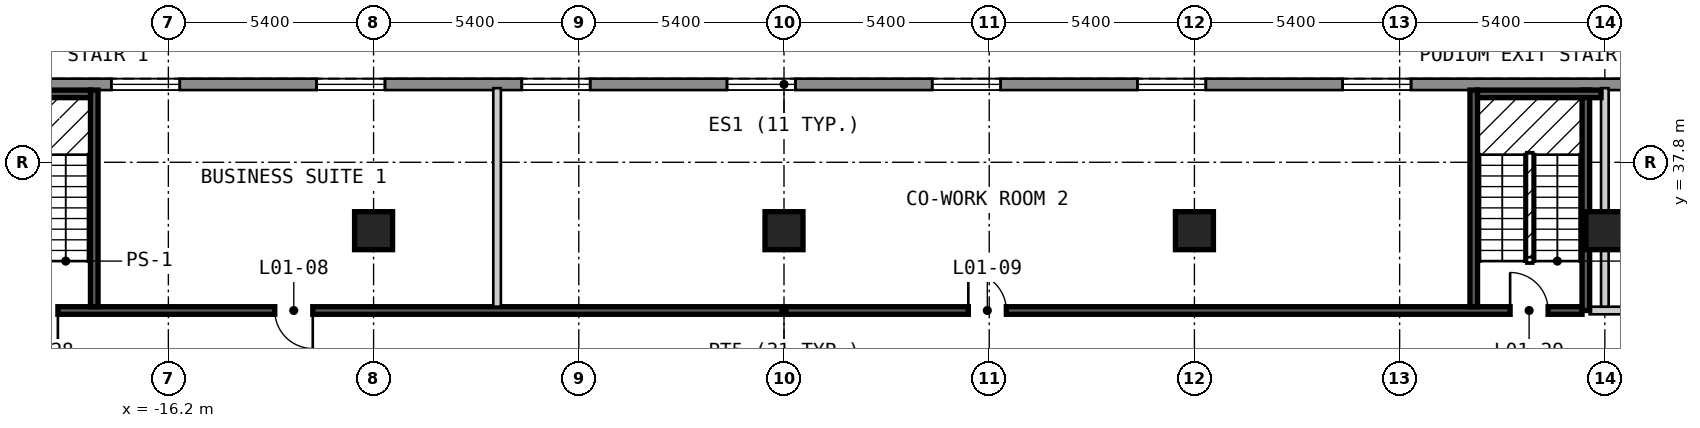
"""IFC4 building model, lengths in metres.
Left out: names, types, materials, properties, quantities, classifications, styles, units other than length and angle.
Written with IfcOpenShell. Run it as: python <this file> out.ifc"""

import sys

from ifc_helpers import new_model, si_unit, direction, frame, frame_2d, origin, origin_2d, place, context, subcontext, project, spatial, rectangle, extrude, element, fill, save


model = new_model("IFC4")
c1 = context("Model", 3, precision=1e-05, world=origin(), true_north=direction((0.0, 1.0)))
c2 = subcontext(c1, "Body", "Model", "MODEL_VIEW")
j1 = project(units=[si_unit("LENGTHUNIT", "METRE"), si_unit("PLANEANGLEUNIT", "RADIAN")], contexts=[c1])
p1 = place(None, origin())
s1 = spatial("IfcSite", under=j1, at=p1, CompositionType="ELEMENT")
p2 = place(p1, origin())
s2 = spatial("IfcBuilding", under=s1, at=p2, CompositionType="ELEMENT")
p3 = place(p2, frame((0.0, 0.0, 5.0)))
s3 = spatial("IfcBuildingStorey", under=s2, at=p3, CompositionType="ELEMENT", Elevation=5.0)
for number, where, z_axis, x_axis in (
    (1, (-10.8, 36.0, 0.0), (0.0, 0.0, 1.0), (1.0, 0.0, 0.0)),
    (2, (0.0, 36.0, 0.0), (0.0, 0.0, 1.0), (1.0, 0.0, 0.0)),
    (3, (10.8, 36.0, 0.0), (0.0, 0.0, 1.0), (1.0, 0.0, 0.0)),
    (4, (21.6, 36.0, 0.0), (0.0, 0.0, 1.0), (1.0, 0.0, 0.0)),
):
    element("IfcColumn", number, at=place(p3, frame(where, z_axis=z_axis, x_axis=x_axis)), inside=s3, PredefinedType="COLUMN", context=c2, shape_type="SweptSolid", body=[
        extrude(rectangle(XDim=1.0, YDim=1.0, at=origin_2d()), origin(), (0.0, 0.0, 1.0), 4.0),
    ])
p4 = place(p3, frame((47.4, 39.85, 0.0), z_axis=(0.0, 0.0, 1.0), x_axis=(-1.0, 0.0, 0.0)))
e5 = element("IfcWall", 5, at=p4, inside=s3, PredefinedType="SOLIDWALL", context=c2, shape_type="SweptSolid", body=[
    extrude(rectangle(XDim=94.8, YDim=0.3, at=frame_2d((47.4, 0.0))), origin(), (0.0, 0.0, 1.0), 3.5),
])
p5 = place(p4, frame((3.9, 0.0, 0.9)))
e6 = element("IfcOpeningElement", 6, at=p5, cuts=e5, PredefinedType="OPENING", context=c2, shape_type="SweptSolid", body=[
    extrude(rectangle(XDim=1.8, YDim=2.4, at=frame_2d((0.9, 1.2))), frame((0.0, 0.16, 0.0), z_axis=(0.0, -1.0, 0.0), x_axis=(1.0, 0.0, 0.0)), (0.0, 0.0, 1.0), 0.32),
])
p6 = place(p4, frame((9.3, 0.0, 0.9)))
e7 = element("IfcOpeningElement", 7, at=p6, cuts=e5, PredefinedType="OPENING", context=c2, shape_type="SweptSolid", body=[
    extrude(rectangle(XDim=1.8, YDim=2.4, at=frame_2d((0.9, 1.2))), frame((0.0, 0.16, 0.0), z_axis=(0.0, -1.0, 0.0), x_axis=(1.0, 0.0, 0.0)), (0.0, 0.0, 1.0), 0.32),
])
p7 = place(p4, frame((14.7, 0.0, 0.9)))
e8 = element("IfcOpeningElement", 8, at=p7, cuts=e5, PredefinedType="OPENING", context=c2, shape_type="SweptSolid", body=[
    extrude(rectangle(XDim=1.8, YDim=2.4, at=frame_2d((0.9, 1.2))), frame((0.0, 0.16, 0.0), z_axis=(0.0, -1.0, 0.0), x_axis=(1.0, 0.0, 0.0)), (0.0, 0.0, 1.0), 0.32),
])
p8 = place(p4, frame((20.1, 0.0, 0.9)))
e9 = element("IfcOpeningElement", 9, at=p8, cuts=e5, PredefinedType="OPENING", context=c2, shape_type="SweptSolid", body=[
    extrude(rectangle(XDim=1.8, YDim=2.4, at=frame_2d((0.9, 1.2))), frame((0.0, 0.16, 0.0), z_axis=(0.0, -1.0, 0.0), x_axis=(1.0, 0.0, 0.0)), (0.0, 0.0, 1.0), 0.32),
])
p9 = place(p4, frame((30.9, 0.0, 0.9)))
e10 = element("IfcOpeningElement", 10, at=p9, cuts=e5, PredefinedType="OPENING", context=c2, shape_type="SweptSolid", body=[
    extrude(rectangle(XDim=1.8, YDim=2.4, at=frame_2d((0.9, 1.2))), frame((0.0, 0.16, 0.0), z_axis=(0.0, -1.0, 0.0), x_axis=(1.0, 0.0, 0.0)), (0.0, 0.0, 1.0), 0.32),
])
p10 = place(p4, frame((36.3, 0.0, 0.9)))
e11 = element("IfcOpeningElement", 11, at=p10, cuts=e5, PredefinedType="OPENING", context=c2, shape_type="SweptSolid", body=[
    extrude(rectangle(XDim=1.8, YDim=2.4, at=frame_2d((0.9, 1.2))), frame((0.0, 0.16, 0.0), z_axis=(0.0, -1.0, 0.0), x_axis=(1.0, 0.0, 0.0)), (0.0, 0.0, 1.0), 0.32),
])
p11 = place(p4, frame((41.7, 0.0, 0.9)))
e12 = element("IfcOpeningElement", 12, at=p11, cuts=e5, PredefinedType="OPENING", context=c2, shape_type="SweptSolid", body=[
    extrude(rectangle(XDim=1.8, YDim=2.4, at=frame_2d((0.9, 1.2))), frame((0.0, 0.16, 0.0), z_axis=(0.0, -1.0, 0.0), x_axis=(1.0, 0.0, 0.0)), (0.0, 0.0, 1.0), 0.32),
])
p12 = place(p4, frame((47.1, 0.0, 0.9)))
e13 = element("IfcOpeningElement", 13, at=p12, cuts=e5, PredefinedType="OPENING", context=c2, shape_type="SweptSolid", body=[
    extrude(rectangle(XDim=1.8, YDim=2.4, at=frame_2d((0.9, 1.2))), frame((0.0, 0.16, 0.0), z_axis=(0.0, -1.0, 0.0), x_axis=(1.0, 0.0, 0.0)), (0.0, 0.0, 1.0), 0.32),
])
p13 = place(p4, frame((52.5, 0.0, 0.9)))
e14 = element("IfcOpeningElement", 14, at=p13, cuts=e5, PredefinedType="OPENING", context=c2, shape_type="SweptSolid", body=[
    extrude(rectangle(XDim=1.8, YDim=2.4, at=frame_2d((0.9, 1.2))), frame((0.0, 0.16, 0.0), z_axis=(0.0, -1.0, 0.0), x_axis=(1.0, 0.0, 0.0)), (0.0, 0.0, 1.0), 0.32),
])
p14 = place(p4, frame((57.9, 0.0, 0.9)))
e15 = element("IfcOpeningElement", 15, at=p14, cuts=e5, PredefinedType="OPENING", context=c2, shape_type="SweptSolid", body=[
    extrude(rectangle(XDim=1.8, YDim=2.4, at=frame_2d((0.9, 1.2))), frame((0.0, 0.16, 0.0), z_axis=(0.0, -1.0, 0.0), x_axis=(1.0, 0.0, 0.0)), (0.0, 0.0, 1.0), 0.32),
])
p15 = place(p4, frame((63.3, 0.0, 0.9)))
e16 = element("IfcOpeningElement", 16, at=p15, cuts=e5, PredefinedType="OPENING", context=c2, shape_type="SweptSolid", body=[
    extrude(rectangle(XDim=1.8, YDim=2.4, at=frame_2d((0.9, 1.2))), frame((0.0, 0.16, 0.0), z_axis=(0.0, -1.0, 0.0), x_axis=(1.0, 0.0, 0.0)), (0.0, 0.0, 1.0), 0.32),
])
p16 = place(p4, frame((74.1, 0.0, 0.9)))
e17 = element("IfcOpeningElement", 17, at=p16, cuts=e5, PredefinedType="OPENING", context=c2, shape_type="SweptSolid", body=[
    extrude(rectangle(XDim=1.8, YDim=2.4, at=frame_2d((0.9, 1.2))), frame((0.0, 0.16, 0.0), z_axis=(0.0, -1.0, 0.0), x_axis=(1.0, 0.0, 0.0)), (0.0, 0.0, 1.0), 0.32),
])
p17 = place(p4, frame((79.5, 0.0, 0.9)))
e18 = element("IfcOpeningElement", 18, at=p17, cuts=e5, PredefinedType="OPENING", context=c2, shape_type="SweptSolid", body=[
    extrude(rectangle(XDim=1.8, YDim=2.4, at=frame_2d((0.9, 1.2))), frame((0.0, 0.16, 0.0), z_axis=(0.0, -1.0, 0.0), x_axis=(1.0, 0.0, 0.0)), (0.0, 0.0, 1.0), 0.32),
])
p18 = place(p4, frame((84.9, 0.0, 0.9)))
e19 = element("IfcOpeningElement", 19, at=p18, cuts=e5, PredefinedType="OPENING", context=c2, shape_type="SweptSolid", body=[
    extrude(rectangle(XDim=1.8, YDim=2.4, at=frame_2d((0.9, 1.2))), frame((0.0, 0.16, 0.0), z_axis=(0.0, -1.0, 0.0), x_axis=(1.0, 0.0, 0.0)), (0.0, 0.0, 1.0), 0.32),
])
p19 = place(p4, frame((90.3, 0.0, 0.9)))
e20 = element("IfcOpeningElement", 20, at=p19, cuts=e5, PredefinedType="OPENING", context=c2, shape_type="SweptSolid", body=[
    extrude(rectangle(XDim=1.8, YDim=2.4, at=frame_2d((0.9, 1.2))), frame((0.0, 0.16, 0.0), z_axis=(0.0, -1.0, 0.0), x_axis=(1.0, 0.0, 0.0)), (0.0, 0.0, 1.0), 0.32),
])
p20 = place(p3, frame((-21.0, 33.9, 0.0), z_axis=(0.0, 0.0, 1.0), x_axis=(1.0, 0.0, 0.0)))
e21 = element("IfcWall", 21, at=p20, inside=s3, PredefinedType="SOLIDWALL", context=c2, shape_type="SweptSolid", body=[
    extrude(rectangle(XDim=42.0, YDim=0.2, at=frame_2d((21.0, 0.0))), origin(), (0.0, 0.0, 1.0), 3.5),
])
p21 = place(p20, frame((7.6, 0.0, 0.0)))
e22 = element("IfcOpeningElement", 22, at=p21, cuts=e21, PredefinedType="OPENING", context=c2, shape_type="SweptSolid", body=[
    extrude(rectangle(XDim=1.0, YDim=2.1, at=frame_2d((0.5, 1.05))), frame((0.0, 0.11, 0.0), z_axis=(0.0, -1.0, 0.0), x_axis=(1.0, 0.0, 0.0)), (0.0, 0.0, 1.0), 0.22),
])
p22 = place(p20, frame((25.85, 0.0, 0.0)))
e23 = element("IfcOpeningElement", 23, at=p22, cuts=e21, PredefinedType="OPENING", context=c2, shape_type="SweptSolid", body=[
    extrude(rectangle(XDim=1.0, YDim=2.1, at=frame_2d((0.5, 1.05))), frame((0.0, 0.11, 0.0), z_axis=(0.0, -1.0, 0.0), x_axis=(1.0, 0.0, 0.0)), (0.0, 0.0, 1.0), 0.22),
])
p23 = place(p20, frame((0.893, 0.0, 0.0)))
e24 = element("IfcOpeningElement", 24, at=p23, cuts=e21, PredefinedType="OPENING", context=c2, shape_type="SweptSolid", body=[
    extrude(rectangle(XDim=1.0, YDim=2.1, at=frame_2d((0.5, 1.05))), frame((0.0, 0.11, 0.0), z_axis=(0.0, -1.0, 0.0), x_axis=(1.0, 0.0, 0.0)), (0.0, 0.0, 1.0), 0.22),
])
p24 = place(p20, frame((40.107, 0.0, 0.0)))
e25 = element("IfcOpeningElement", 25, at=p24, cuts=e21, PredefinedType="OPENING", context=c2, shape_type="SweptSolid", body=[
    extrude(rectangle(XDim=1.0, YDim=2.1, at=frame_2d((0.5, 1.05))), frame((0.0, 0.11, 0.0), z_axis=(0.0, -1.0, 0.0), x_axis=(1.0, 0.0, 0.0)), (0.0, 0.0, 1.0), 0.22),
])
p25 = place(p3, frame((21.2, 33.9, 0.0), z_axis=(0.0, 0.0, 1.0), x_axis=(1.0, 0.0, 0.0)))
e26 = element("IfcWall", 26, at=p25, inside=s3, PredefinedType="PARTITIONING", context=c2, shape_type="SweptSolid", body=[
    extrude(rectangle(XDim=26.55, YDim=0.2, at=frame_2d((13.275, 0.0))), origin(), (0.0, 0.0, 1.0), 3.5),
])
p26 = place(p25, frame((8.419, 0.0, 0.0)))
e27 = element("IfcOpeningElement", 27, at=p26, cuts=e26, PredefinedType="OPENING", context=c2, shape_type="SweptSolid", body=[
    extrude(rectangle(XDim=1.0, YDim=2.1, at=frame_2d((0.5, 1.05))), frame((0.0, 0.11, 0.0), z_axis=(0.0, -1.0, 0.0), x_axis=(1.0, 0.0, 0.0)), (0.0, 0.0, 1.0), 0.22),
])
p27 = place(p3, frame((-18.15, 34.0, 0.0), z_axis=(0.0, 0.0, 1.0), x_axis=(0.0, 1.0, 0.0)))
e28 = element("IfcWall", 28, at=p27, inside=s3, PredefinedType="SOLIDWALL", context=c2, shape_type="SweptSolid", body=[
    extrude(rectangle(XDim=5.7, YDim=0.2, at=frame_2d((2.85, 0.0))), origin(), (0.0, 0.0, 1.0), 3.5),
])
p28 = place(p3, frame((-7.55, 34.0, 0.0), z_axis=(0.0, 0.0, 1.0), x_axis=(0.0, 1.0, 0.0)))
e29 = element("IfcWall", 29, at=p28, inside=s3, PredefinedType="PARTITIONING", context=c2, shape_type="SweptSolid", body=[
    extrude(rectangle(XDim=5.75, YDim=0.2, at=frame_2d((2.875, 0.0))), origin(), (0.0, 0.0, 1.0), 3.5),
])
p29 = place(p3, frame((18.15, 34.0, 0.0), z_axis=(0.0, 0.0, 1.0), x_axis=(0.0, 1.0, 0.0)))
e30 = element("IfcWall", 30, at=p29, inside=s3, PredefinedType="SOLIDWALL", context=c2, shape_type="SweptSolid", body=[
    extrude(rectangle(XDim=5.7, YDim=0.2, at=frame_2d((2.85, 0.0))), origin(), (0.0, 0.0, 1.0), 3.5),
])
p30 = place(p3, frame((21.1, 33.9, 0.0), z_axis=(0.0, 0.0, 1.0), x_axis=(0.0, 1.0, 0.0)))
e31 = element("IfcWall", 31, at=p30, inside=s3, PredefinedType="SOLIDWALL", context=c2, shape_type="SweptSolid", body=[
    extrude(rectangle(XDim=5.8, YDim=0.2, at=frame_2d((2.9, 0.0))), origin(), (0.0, 0.0, 1.0), 3.5),
])
p31 = place(p3, frame((21.6, 34.0, 0.0), z_axis=(0.0, 0.0, 1.0), x_axis=(0.0, 1.0, 0.0)))
e32 = element("IfcWall", 32, at=p31, inside=s3, PredefinedType="PARTITIONING", context=c2, shape_type="SweptSolid", body=[
    extrude(rectangle(XDim=5.75, YDim=0.2, at=frame_2d((2.875, 0.0))), origin(), (0.0, 0.0, 1.0), 3.5),
])
for number, where, z_axis, x_axis in (
    (33, (-21.5, 39.6, 0.0), (0.0, 0.0, 1.0), (1.0, 0.0, 0.0)),
    (34, (18.25, 39.6, 0.0), (0.0, 0.0, 1.0), (1.0, 0.0, 0.0)),
):
    element("IfcWall", number, at=place(p3, frame(where, z_axis=z_axis, x_axis=x_axis)), inside=s3, PredefinedType="SOLIDWALL", context=c2, shape_type="SweptSolid", body=[
        extrude(rectangle(XDim=3.25, YDim=0.2, at=frame_2d((1.625, 0.0))), origin(), (0.0, 0.0, 1.0), 3.5),
    ])
p32 = place(p9, origin())
e35 = element("IfcWindow", 35, at=p32, inside=s3, PartitioningType="SINGLE_PANEL", PredefinedType="WINDOW", context=c2, shape_type="SweptSolid", body=[
    extrude(rectangle(XDim=1.8, YDim=2.4, at=frame_2d((0.9, 1.2))), frame((0.0, 0.03, 0.0), z_axis=(0.0, -1.0, 0.0), x_axis=(1.0, 0.0, 0.0)), (0.0, 0.0, 1.0), 0.06),
])
fill(e10, e35)
p33 = place(p10, origin())
e36 = element("IfcWindow", 36, at=p33, inside=s3, PartitioningType="SINGLE_PANEL", PredefinedType="WINDOW", context=c2, shape_type="SweptSolid", body=[
    extrude(rectangle(XDim=1.8, YDim=2.4, at=frame_2d((0.9, 1.2))), frame((0.0, 0.03, 0.0), z_axis=(0.0, -1.0, 0.0), x_axis=(1.0, 0.0, 0.0)), (0.0, 0.0, 1.0), 0.06),
])
fill(e11, e36)
p34 = place(p11, origin())
e37 = element("IfcWindow", 37, at=p34, inside=s3, PartitioningType="SINGLE_PANEL", PredefinedType="WINDOW", context=c2, shape_type="SweptSolid", body=[
    extrude(rectangle(XDim=1.8, YDim=2.4, at=frame_2d((0.9, 1.2))), frame((0.0, 0.03, 0.0), z_axis=(0.0, -1.0, 0.0), x_axis=(1.0, 0.0, 0.0)), (0.0, 0.0, 1.0), 0.06),
])
fill(e12, e37)
p35 = place(p12, origin())
e38 = element("IfcWindow", 38, at=p35, inside=s3, PartitioningType="SINGLE_PANEL", PredefinedType="WINDOW", context=c2, shape_type="SweptSolid", body=[
    extrude(rectangle(XDim=1.8, YDim=2.4, at=frame_2d((0.9, 1.2))), frame((0.0, 0.03, 0.0), z_axis=(0.0, -1.0, 0.0), x_axis=(1.0, 0.0, 0.0)), (0.0, 0.0, 1.0), 0.06),
])
fill(e13, e38)
p36 = place(p13, origin())
e39 = element("IfcWindow", 39, at=p36, inside=s3, PartitioningType="SINGLE_PANEL", PredefinedType="WINDOW", context=c2, shape_type="SweptSolid", body=[
    extrude(rectangle(XDim=1.8, YDim=2.4, at=frame_2d((0.9, 1.2))), frame((0.0, 0.03, 0.0), z_axis=(0.0, -1.0, 0.0), x_axis=(1.0, 0.0, 0.0)), (0.0, 0.0, 1.0), 0.06),
])
fill(e14, e39)
p37 = place(p14, origin())
e40 = element("IfcWindow", 40, at=p37, inside=s3, PartitioningType="SINGLE_PANEL", PredefinedType="WINDOW", context=c2, shape_type="SweptSolid", body=[
    extrude(rectangle(XDim=1.8, YDim=2.4, at=frame_2d((0.9, 1.2))), frame((0.0, 0.03, 0.0), z_axis=(0.0, -1.0, 0.0), x_axis=(1.0, 0.0, 0.0)), (0.0, 0.0, 1.0), 0.06),
])
fill(e15, e40)
p38 = place(p15, origin())
e41 = element("IfcWindow", 41, at=p38, inside=s3, PartitioningType="SINGLE_PANEL", PredefinedType="WINDOW", context=c2, shape_type="SweptSolid", body=[
    extrude(rectangle(XDim=1.8, YDim=2.4, at=frame_2d((0.9, 1.2))), frame((0.0, 0.03, 0.0), z_axis=(0.0, -1.0, 0.0), x_axis=(1.0, 0.0, 0.0)), (0.0, 0.0, 1.0), 0.06),
])
fill(e16, e41)
p39 = place(p21, origin())
e42 = element("IfcDoor", 42, at=p39, inside=s3, OperationType="SINGLE_SWING_RIGHT", PredefinedType="DOOR", context=c2, shape_type="SweptSolid", body=[
    extrude(rectangle(XDim=1.0, YDim=2.1, at=frame_2d((0.5, 1.05))), frame((0.0, 0.025, 0.0), z_axis=(0.0, -1.0, 0.0), x_axis=(1.0, 0.0, 0.0)), (0.0, 0.0, 1.0), 0.05),
])
fill(e22, e42)
p40 = place(p22, origin())
e43 = element("IfcDoor", 43, at=p40, inside=s3, OperationType="SINGLE_SWING_LEFT", PredefinedType="DOOR", context=c2, shape_type="SweptSolid", body=[
    extrude(rectangle(XDim=1.0, YDim=2.1, at=frame_2d((0.5, 1.05))), frame((0.0, 0.025, 0.0), z_axis=(0.0, -1.0, 0.0), x_axis=(1.0, 0.0, 0.0)), (0.0, 0.0, 1.0), 0.05),
])
fill(e23, e43)
p41 = place(p23, origin())
e44 = element("IfcDoor", 44, at=p41, inside=s3, OperationType="SINGLE_SWING_RIGHT", PredefinedType="DOOR", context=c2, shape_type="SweptSolid", body=[
    extrude(rectangle(XDim=1.0, YDim=2.1, at=frame_2d((0.5, 1.05))), frame((0.0, 0.025, 0.0), z_axis=(0.0, -1.0, 0.0), x_axis=(1.0, 0.0, 0.0)), (0.0, 0.0, 1.0), 0.05),
])
fill(e24, e44)
p42 = place(p24, origin())
e45 = element("IfcDoor", 45, at=p42, inside=s3, OperationType="SINGLE_SWING_LEFT", PredefinedType="DOOR", context=c2, shape_type="SweptSolid", body=[
    extrude(rectangle(XDim=1.0, YDim=2.1, at=frame_2d((0.5, 1.05))), frame((0.0, 0.025, 0.0), z_axis=(0.0, -1.0, 0.0), x_axis=(1.0, 0.0, 0.0)), (0.0, 0.0, 1.0), 0.05),
])
fill(e25, e45)
save(model, sys.argv[1])
